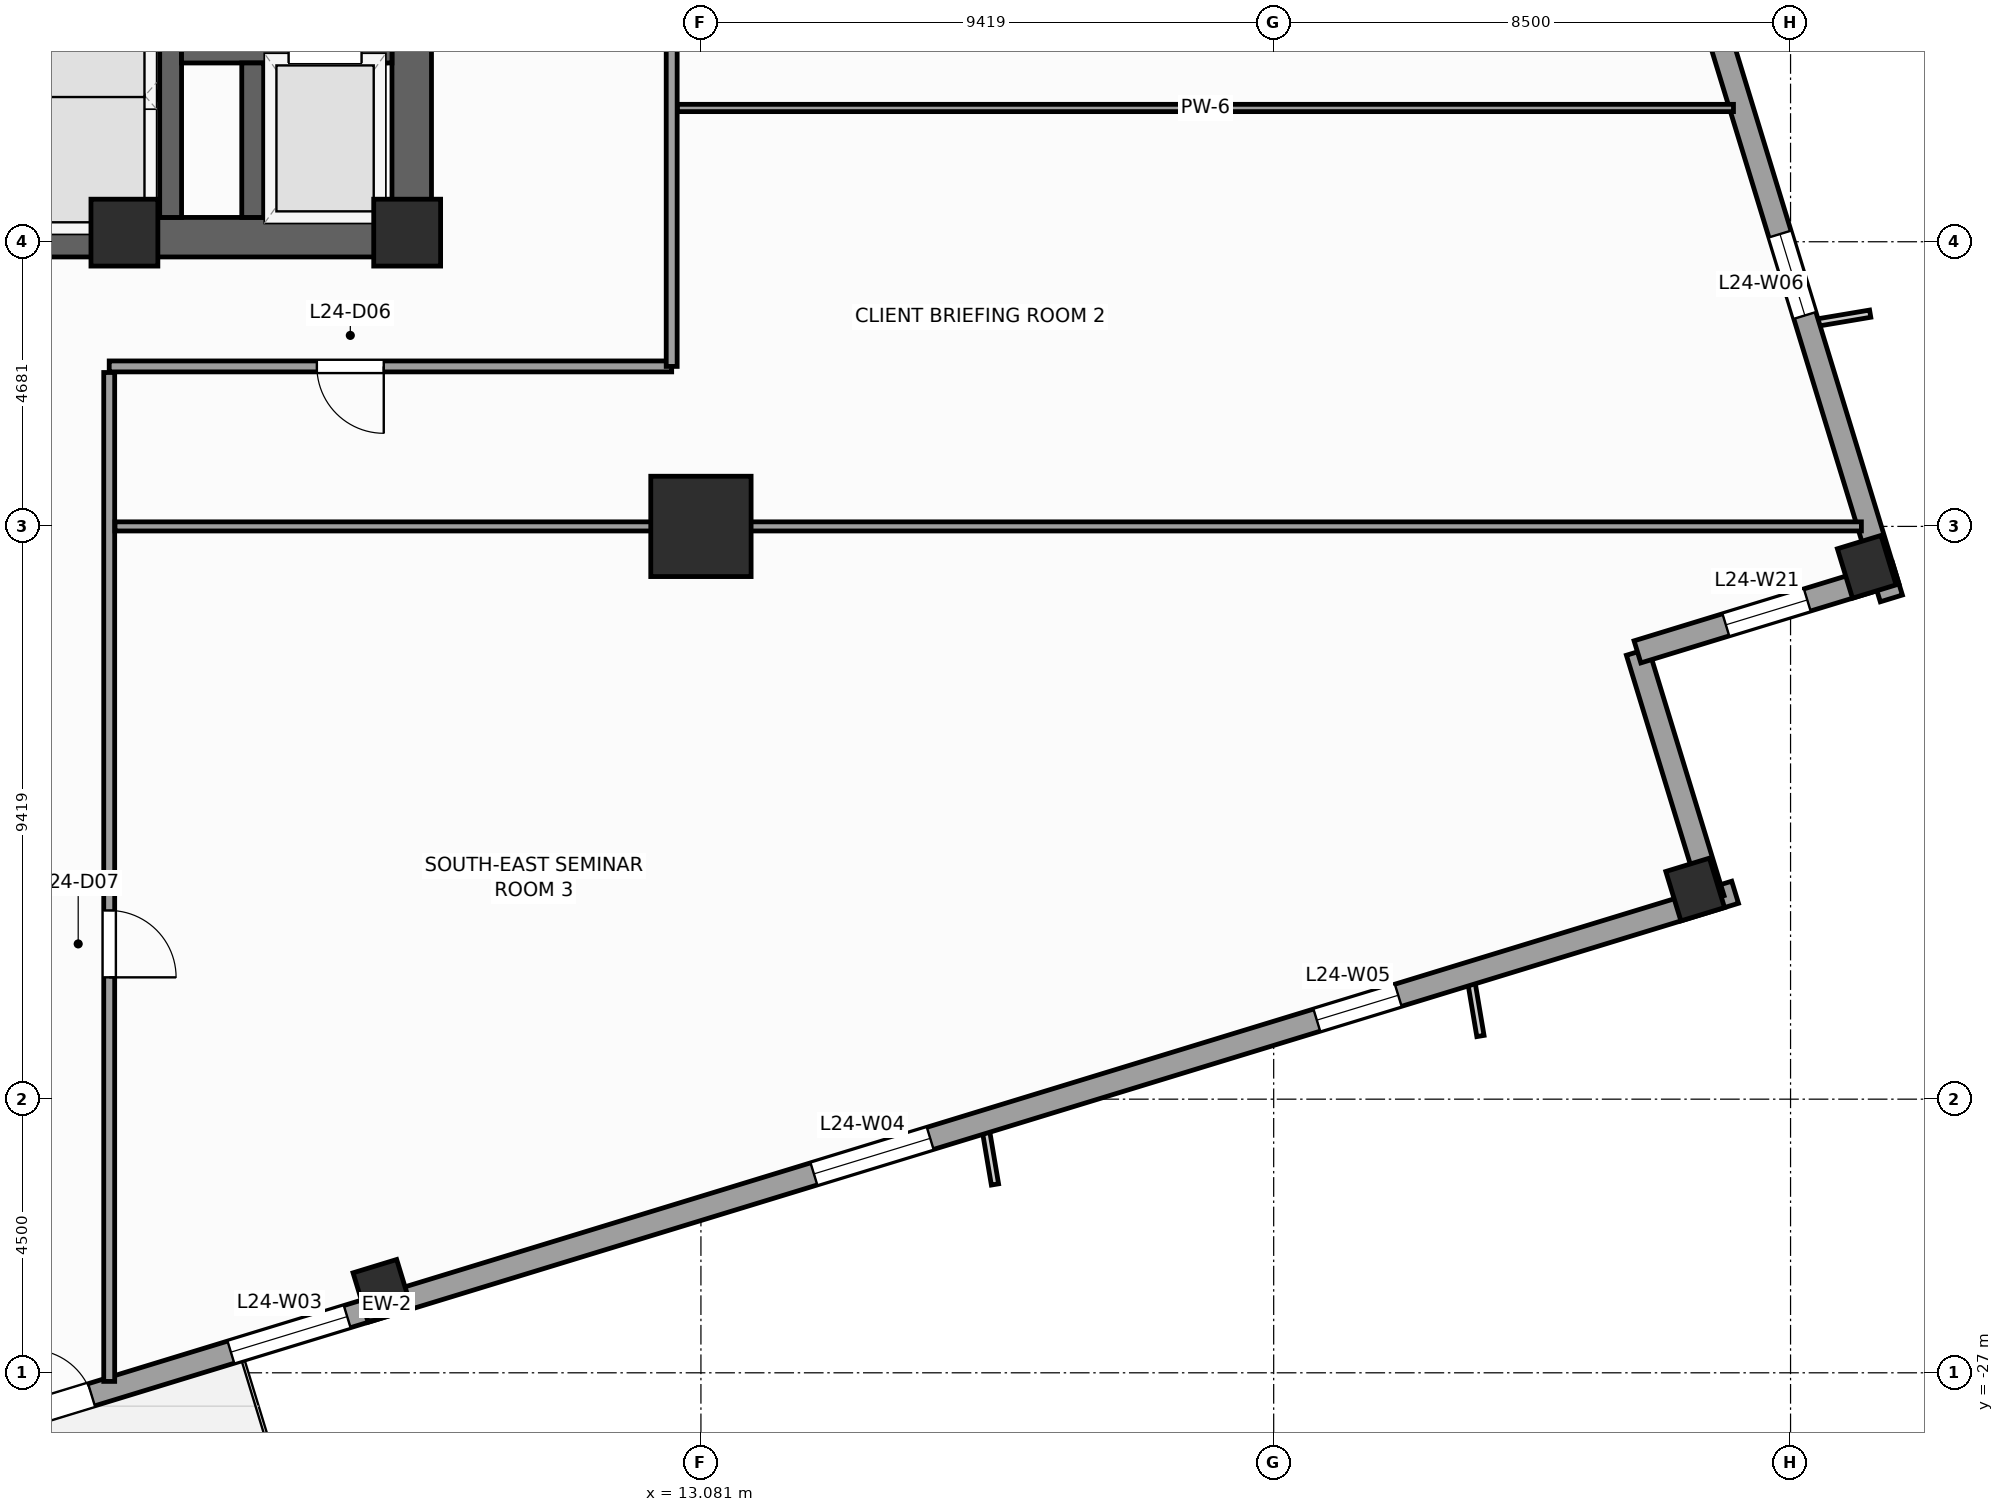
"""IFC4 building model, lengths in metres.
Left out: names, types, materials, properties, quantities, classifications, styles, units other than length and angle.
Written with IfcOpenShell. Run it as: python <this file> out.ifc"""

import sys

from ifc_helpers import new_model, si_unit, direction, frame, frame_2d, origin, origin_2d, place, context, subcontext, project, spatial, rectangle, extrude, source, transform, mapped, element, fill, save


model = new_model("IFC4")
c1 = context("Model", 3, precision=1e-05, world=origin(), true_north=direction((0.0, 1.0)))
c2 = subcontext(c1, "Body", "Model", "MODEL_VIEW")
j1 = project(units=[si_unit("LENGTHUNIT", "METRE"), si_unit("PLANEANGLEUNIT", "RADIAN")], contexts=[c1])
p1 = place(None, origin())
s1 = spatial("IfcSite", under=j1, at=p1, CompositionType="ELEMENT")
p2 = place(p1, origin())
s2 = spatial("IfcBuilding", under=s1, at=p2, CompositionType="ELEMENT")
p3 = place(p2, frame((0.0, 0.0, 103.2)))
s3 = spatial("IfcBuildingStorey", under=s2, at=p3, CompositionType="ELEMENT", Elevation=103.2)
p4 = place(p3, frame((-8.65, -8.325, 0.0), z_axis=(0.0, 0.0, 1.0), x_axis=(1.0, 0.0, 0.0)))
e1 = element("IfcWall", 1, at=p4, inside=s3, PredefinedType="SHEAR", context=c2, shape_type="SweptSolid", body=[
    extrude(rectangle(XDim=17.3, YDim=0.65, at=frame_2d((8.65, 0.0))), origin(), (0.0, 0.0, 1.0), 4.0),
])
p5 = place(p4, frame((8.0, 0.0, 0.0)))
e2 = element("IfcOpeningElement", 2, at=p5, cuts=e1, PredefinedType="OPENING", context=c2, shape_type="SweptSolid", body=[
    extrude(rectangle(XDim=1.3, YDim=2.2, at=frame_2d((0.65, 1.1))), frame((0.0, 0.335, 0.0), z_axis=(0.0, -1.0, 0.0), x_axis=(1.0, 0.0, 0.0)), (0.0, 0.0, 1.0), 0.67),
])
p6 = place(p3, frame((8.325, -8.0, 0.0), z_axis=(0.0, 0.0, 1.0), x_axis=(0.0, 1.0, 0.0)))
e3 = element("IfcWall", 3, at=p6, inside=s3, PredefinedType="SHEAR", context=c2, shape_type="SweptSolid", body=[
    extrude(rectangle(XDim=16.0, YDim=0.65, at=frame_2d((8.0, 0.0))), origin(), (0.0, 0.0, 1.0), 4.0),
])
p7 = place(p6, frame((4.69, 0.0, 0.0)))
e4 = element("IfcOpeningElement", 4, at=p7, cuts=e3, PredefinedType="OPENING", context=c2, shape_type="SweptSolid", body=[
    extrude(rectangle(XDim=1.3, YDim=2.2, at=frame_2d((0.65, 1.1))), frame((0.0, 0.335, 0.0), z_axis=(0.0, -1.0, 0.0), x_axis=(1.0, 0.0, 0.0)), (0.0, 0.0, 1.0), 0.67),
])
p8 = place(p3, frame((4.36, -8.0, 0.0), z_axis=(0.0, 0.0, 1.0), x_axis=(0.0, 1.0, 0.0)))
e5 = element("IfcWall", 5, at=p8, inside=s3, PredefinedType="SHEAR", context=c2, shape_type="SweptSolid", body=[
    extrude(rectangle(XDim=16.0, YDim=0.36, at=frame_2d((8.0, 0.0))), origin(), (0.0, 0.0, 1.0), 4.0),
])
p9 = place(p3, frame((4.54, -5.28, 0.0), z_axis=(0.0, 0.0, 1.0), x_axis=(1.0, 0.0, 0.0)))
e6 = element("IfcWall", 6, at=p9, inside=s3, PredefinedType="SHEAR", context=c2, shape_type="SweptSolid", body=[
    extrude(rectangle(XDim=3.46, YDim=0.36, at=frame_2d((1.73, 0.0))), origin(), (0.0, 0.0, 1.0), 4.0),
])
p10 = place(p9, frame((1.76, 0.0, 0.0)))
e7 = element("IfcOpeningElement", 7, at=p10, cuts=e6, PredefinedType="OPENING", context=c2, shape_type="SweptSolid", body=[
    extrude(rectangle(XDim=1.2, YDim=2.25, at=frame_2d((0.6, 1.125))), frame((0.0, 0.19, 0.0), z_axis=(0.0, -1.0, 0.0), x_axis=(1.0, 0.0, 0.0)), (0.0, 0.0, 1.0), 0.38),
])
p11 = place(p3, frame((5.71, -8.0, 0.0), z_axis=(0.0, 0.0, 1.0), x_axis=(0.0, 1.0, 0.0)))
e8 = element("IfcWall", 8, at=p11, inside=s3, PredefinedType="SHEAR", context=c2, shape_type="SweptSolid", body=[
    extrude(rectangle(XDim=2.54, YDim=0.36, at=frame_2d((1.27, 0.0))), origin(), (0.0, 0.0, 1.0), 4.0),
])
m1 = source(origin(), c2, "Body", "SweptSolid", [
    extrude(rectangle(XDim=1.1, YDim=1.1, at=origin_2d()), origin(), (0.0, 0.0, 1.0), 4.0),
])
for number, where, z_axis, x_axis in (
    (9, (8.25, -8.25, 0.0), (0.0, 0.0, 1.0), (1.0, 0.0, 0.0)),
    (10, (3.6, -8.25, 0.0), (0.0, 0.0, 1.0), (1.0, 0.0, 0.0)),
):
    element("IfcColumn", number, at=place(p3, frame(where, z_axis=z_axis, x_axis=x_axis)), inside=s3, PredefinedType="PILASTER", context=c2, shape_type="MappedRepresentation", body=[
        mapped(m1, transform((0.0, 0.0, 0.0), scale=1.0)),
    ])
m2 = source(origin(), c2, "Body", "SweptSolid", [
    extrude(rectangle(XDim=1.65, YDim=1.65, at=origin_2d()), origin(), (0.0, 0.0, 1.0), 4.0),
])
p12 = place(p3, frame((13.081, -13.081, 0.0), z_axis=(0.0, 0.0, 1.0), x_axis=(1.0, 0.0, 0.0)))
e11 = element("IfcColumn", 11, at=p12, inside=s3, PredefinedType="COLUMN", context=c2, shape_type="MappedRepresentation", body=[
    mapped(m2, transform((0.0, 0.0, 0.0), scale=1.0)),
])
m3 = source(origin(), c2, "Body", "SweptSolid", [
    extrude(rectangle(XDim=0.75, YDim=0.85, at=origin_2d()), origin(), (0.0, 0.0, 1.0), 4.0),
])
for number, where, z_axis, x_axis in (
    (12, (7.843, -25.653, 0.0), (0.0, 0.0, 1.0), (0.956, 0.292, 0.0)),
    (13, (29.431, -19.052, 0.0), (0.0, 0.0, 1.0), (0.956, 0.292, 0.0)),
    (14, (32.253, -13.746, 0.0), (0.0, 0.0, 1.0), (0.956, 0.292, 0.0)),
):
    element("IfcColumn", number, at=place(p3, frame(where, z_axis=z_axis, x_axis=x_axis)), inside=s3, PredefinedType="COLUMN", context=c2, shape_type="MappedRepresentation", body=[
        mapped(m3, transform((0.0, 0.0, 0.0), scale=1.0)),
    ])
p13 = place(p3, frame((-14.265, -32.658, 0.0), z_axis=(0.0, 0.0, 1.0), x_axis=(0.956304320851, 0.292373127906, 0.0)))
e15 = element("IfcWall", 15, at=p13, inside=s3, PredefinedType="STANDARD", context=c2, shape_type="SweptSolid", body=[
    extrude(rectangle(XDim=46.38, YDim=0.38, at=frame_2d((23.19, 0.0))), origin(), (0.0, 0.0, 1.0), 3.14),
])
p14 = place(p13, frame((17.065, 0.0, 0.0)))
e16 = element("IfcOpeningElement", 16, at=p14, cuts=e15, PredefinedType="OPENING", context=c2, shape_type="SweptSolid", body=[
    extrude(rectangle(XDim=1.05, YDim=2.25, at=frame_2d((0.525, 1.125))), frame((0.0, 0.2, 0.0), z_axis=(0.0, -1.0, 0.0), x_axis=(1.0, 0.0, 0.0)), (0.0, 0.0, 1.0), 0.4),
])
p15 = place(p13, frame((4.865, 0.0, 0.51)))
e17 = element("IfcOpeningElement", 17, at=p15, cuts=e15, PredefinedType="OPENING", context=c2, shape_type="SweptSolid", body=[
    extrude(rectangle(XDim=1.4, YDim=2.4, at=frame_2d((0.7, 1.2))), frame((0.0, 0.2, 0.0), z_axis=(0.0, -1.0, 0.0), x_axis=(1.0, 0.0, 0.0)), (0.0, 0.0, 1.0), 0.4),
])
p16 = place(p13, frame((12.45, 0.0, 0.51)))
e18 = element("IfcOpeningElement", 18, at=p16, cuts=e15, PredefinedType="OPENING", context=c2, shape_type="SweptSolid", body=[
    extrude(rectangle(XDim=2.0, YDim=2.4, at=frame_2d((1.0, 1.2))), frame((0.0, 0.2, 0.0), z_axis=(0.0, -1.0, 0.0), x_axis=(1.0, 0.0, 0.0)), (0.0, 0.0, 1.0), 0.4),
])
p17 = place(p13, frame((20.512, 0.0, 0.51)))
e19 = element("IfcOpeningElement", 19, at=p17, cuts=e15, PredefinedType="OPENING", context=c2, shape_type="SweptSolid", body=[
    extrude(rectangle(XDim=2.0, YDim=2.4, at=frame_2d((1.0, 1.2))), frame((0.0, 0.2, 0.0), z_axis=(0.0, -1.0, 0.0), x_axis=(1.0, 0.0, 0.0)), (0.0, 0.0, 1.0), 0.4),
])
p18 = place(p13, frame((30.538, 0.0, 0.51)))
e20 = element("IfcOpeningElement", 20, at=p18, cuts=e15, PredefinedType="OPENING", context=c2, shape_type="SweptSolid", body=[
    extrude(rectangle(XDim=2.0, YDim=2.4, at=frame_2d((1.0, 1.2))), frame((0.0, 0.2, 0.0), z_axis=(0.0, -1.0, 0.0), x_axis=(1.0, 0.0, 0.0)), (0.0, 0.0, 1.0), 0.4),
])
p19 = place(p13, frame((39.187, 0.0, 0.51)))
e21 = element("IfcOpeningElement", 21, at=p19, cuts=e15, PredefinedType="OPENING", context=c2, shape_type="SweptSolid", body=[
    extrude(rectangle(XDim=1.4, YDim=2.4, at=frame_2d((0.7, 1.2))), frame((0.0, 0.2, 0.0), z_axis=(0.0, -1.0, 0.0), x_axis=(1.0, 0.0, 0.0)), (0.0, 0.0, 1.0), 0.4),
])
p20 = place(p3, frame((29.725, -19.208, 0.0), z_axis=(0.0, 0.0, 1.0), x_axis=(-0.292345507338, 0.956312764915, 0.0)))
e22 = element("IfcWall", 22, at=p20, inside=s3, PredefinedType="STANDARD", context=c2, shape_type="SweptSolid", body=[
    extrude(rectangle(XDim=4.25, YDim=0.38, at=frame_2d((2.125, 0.0))), origin(), (0.0, 0.0, 1.0), 3.74),
])
p21 = place(p3, frame((28.482, -15.144, 0.0), z_axis=(0.0, 0.0, 1.0), x_axis=(0.956304176051, 0.292373601522, 0.0)))
e23 = element("IfcWall", 23, at=p21, inside=s3, PredefinedType="STANDARD", context=c2, shape_type="SweptSolid", body=[
    extrude(rectangle(XDim=4.44, YDim=0.38, at=frame_2d((2.22, 0.0))), origin(), (0.0, 0.0, 1.0), 3.04),
])
p22 = place(p21, frame((1.52, 0.0, 0.51)))
e24 = element("IfcOpeningElement", 24, at=p22, cuts=e23, PredefinedType="OPENING", context=c2, shape_type="SweptSolid", body=[
    extrude(rectangle(XDim=1.4, YDim=2.4, at=frame_2d((0.7, 1.2))), frame((0.0, 0.2, 0.0), z_axis=(0.0, -1.0, 0.0), x_axis=(1.0, 0.0, 0.0)), (0.0, 0.0, 1.0), 0.4),
])
p23 = place(p3, frame((32.658, -14.265, 0.0), z_axis=(0.0, 0.0, 1.0), x_axis=(-0.292373127906, 0.956304320851, 0.0)))
e25 = element("IfcWall", 25, at=p23, inside=s3, PredefinedType="STANDARD", context=c2, shape_type="SweptSolid", body=[
    extrude(rectangle(XDim=46.38, YDim=0.38, at=frame_2d((23.19, 0.0))), origin(), (0.0, 0.0, 1.0), 3.14),
])
p24 = place(p23, frame((4.865, 0.0, 0.51)))
e26 = element("IfcOpeningElement", 26, at=p24, cuts=e25, PredefinedType="OPENING", context=c2, shape_type="SweptSolid", body=[
    extrude(rectangle(XDim=1.4, YDim=2.4, at=frame_2d((0.7, 1.2))), frame((0.0, 0.2, 0.0), z_axis=(0.0, -1.0, 0.0), x_axis=(1.0, 0.0, 0.0)), (0.0, 0.0, 1.0), 0.4),
])
p25 = place(p23, frame((10.95, 0.0, 0.51)))
e27 = element("IfcOpeningElement", 27, at=p25, cuts=e25, PredefinedType="OPENING", context=c2, shape_type="SweptSolid", body=[
    extrude(rectangle(XDim=2.0, YDim=2.4, at=frame_2d((1.0, 1.2))), frame((0.0, 0.2, 0.0), z_axis=(0.0, -1.0, 0.0), x_axis=(1.0, 0.0, 0.0)), (0.0, 0.0, 1.0), 0.4),
])
p26 = place(p23, frame((20.512, 0.0, 0.51)))
e28 = element("IfcOpeningElement", 28, at=p26, cuts=e25, PredefinedType="OPENING", context=c2, shape_type="SweptSolid", body=[
    extrude(rectangle(XDim=2.0, YDim=2.4, at=frame_2d((1.0, 1.2))), frame((0.0, 0.2, 0.0), z_axis=(0.0, -1.0, 0.0), x_axis=(1.0, 0.0, 0.0)), (0.0, 0.0, 1.0), 0.4),
])
p27 = place(p23, frame((30.538, 0.0, 0.51)))
e29 = element("IfcOpeningElement", 29, at=p27, cuts=e25, PredefinedType="OPENING", context=c2, shape_type="SweptSolid", body=[
    extrude(rectangle(XDim=2.0, YDim=2.4, at=frame_2d((1.0, 1.2))), frame((0.0, 0.2, 0.0), z_axis=(0.0, -1.0, 0.0), x_axis=(1.0, 0.0, 0.0)), (0.0, 0.0, 1.0), 0.4),
])
p28 = place(p23, frame((39.187, 0.0, 0.51)))
e30 = element("IfcOpeningElement", 30, at=p28, cuts=e25, PredefinedType="OPENING", context=c2, shape_type="SweptSolid", body=[
    extrude(rectangle(XDim=1.4, YDim=2.4, at=frame_2d((0.7, 1.2))), frame((0.0, 0.2, 0.0), z_axis=(0.0, -1.0, 0.0), x_axis=(1.0, 0.0, 0.0)), (0.0, 0.0, 1.0), 0.4),
])
p29 = place(p3, frame((1.9, -6.0, 0.0), z_axis=(0.0, 0.0, 1.0), x_axis=(1.0, 0.0, 0.0)))
e31 = element("IfcWall", 31, at=p29, inside=s3, PredefinedType="PARTITIONING", context=c2, shape_type="SweptSolid", body=[
    extrude(rectangle(XDim=2.26, YDim=0.12, at=frame_2d((1.13, 0.0))), origin(), (0.0, 0.0, 1.0), 3.74),
])
p30 = place(p3, frame((3.35, -10.45, 0.0), z_axis=(0.0, 0.0, 1.0), x_axis=(1.0, 0.0, 0.0)))
e32 = element("IfcWall", 32, at=p30, inside=s3, PredefinedType="PARTITIONING", context=c2, shape_type="SweptSolid", body=[
    extrude(rectangle(XDim=9.25, YDim=0.18, at=frame_2d((4.625, 0.0))), origin(), (0.0, 0.0, 1.0), 3.74),
])
p31 = place(p30, frame((3.415, 0.0, 0.0)))
e33 = element("IfcOpeningElement", 33, at=p31, cuts=e32, PredefinedType="OPENING", context=c2, shape_type="SweptSolid", body=[
    extrude(rectangle(XDim=1.1, YDim=2.2, at=frame_2d((0.55, 1.1))), frame((0.0, 0.1, 0.0), z_axis=(0.0, -1.0, 0.0), x_axis=(1.0, 0.0, 0.0)), (0.0, 0.0, 1.0), 0.2),
])
p32 = place(p3, frame((12.6, -10.45, 0.0), z_axis=(0.0, 0.0, 1.0), x_axis=(0.0, 1.0, 0.0)))
e34 = element("IfcWall", 34, at=p32, inside=s3, PredefinedType="PARTITIONING", context=c2, shape_type="SweptSolid", body=[
    extrude(rectangle(XDim=9.3, YDim=0.18, at=frame_2d((4.65, 0.0))), origin(), (0.0, 0.0, 1.0), 3.74),
])
p33 = place(p3, frame((3.35, -27.142, 0.0), z_axis=(0.0, 0.0, 1.0), x_axis=(0.0, 1.0, 0.0)))
e35 = element("IfcWall", 35, at=p33, inside=s3, PredefinedType="PARTITIONING", context=c2, shape_type="SweptSolid", body=[
    extrude(rectangle(XDim=16.592, YDim=0.18, at=frame_2d((8.296, 0.0))), origin(), (0.0, 0.0, 1.0), 3.74),
])
p34 = place(p33, frame((6.645, 0.0, 0.0)))
e36 = element("IfcOpeningElement", 36, at=p34, cuts=e35, PredefinedType="OPENING", context=c2, shape_type="SweptSolid", body=[
    extrude(rectangle(XDim=1.1, YDim=2.2, at=frame_2d((0.55, 1.1))), frame((0.0, 0.1, 0.0), z_axis=(0.0, -1.0, 0.0), x_axis=(1.0, 0.0, 0.0)), (0.0, 0.0, 1.0), 0.2),
])
p35 = place(p3, frame((3.445, -13.081, 0.0), z_axis=(0.0, 0.0, 1.0), x_axis=(1.0, 0.0, 0.0)))
e37 = element("IfcWall", 37, at=p35, inside=s3, PredefinedType="PARTITIONING", context=c2, shape_type="SweptSolid", body=[
    extrude(rectangle(XDim=28.72, YDim=0.15, at=frame_2d((14.36, 0.0))), origin(), (0.0, 0.0, 1.0), 2.732),
])
p36 = place(p3, frame((12.695, -6.2, 0.0), z_axis=(0.0, 0.0, 1.0), x_axis=(1.0, 0.0, 0.0)))
e38 = element("IfcWall", 38, at=p36, inside=s3, PredefinedType="PARTITIONING", context=c2, shape_type="SweptSolid", body=[
    extrude(rectangle(XDim=17.366, YDim=0.12, at=frame_2d((8.683, 0.0))), origin(), (0.0, 0.0, 1.0), 3.74),
])
m4 = source(origin(), c2, "Body", "SweptSolid", [
    extrude(rectangle(XDim=1.05, YDim=2.25, at=frame_2d((0.525, 1.125))), frame((0.0, 0.025, 0.0), z_axis=(0.0, -1.0, 0.0), x_axis=(1.0, 0.0, 0.0)), (0.0, 0.0, 1.0), 0.05),
])
p37 = place(p14, origin())
e39 = element("IfcDoor", 39, at=p37, inside=s3, OperationType="SINGLE_SWING_LEFT", PredefinedType="DOOR", context=c2, shape_type="MappedRepresentation", body=[
    mapped(m4, transform((0.0, 0.0, 0.0), scale=1.0)),
])
fill(e16, e39)
m5 = source(origin(), c2, "Body", "SweptSolid", [
    extrude(rectangle(XDim=2.0, YDim=2.4, at=frame_2d((1.0, 1.2))), frame((0.0, 0.03, 0.0), z_axis=(0.0, -1.0, 0.0), x_axis=(1.0, 0.0, 0.0)), (0.0, 0.0, 1.0), 0.06),
])
p38 = place(p17, origin())
e40 = element("IfcWindow", 40, at=p38, inside=s3, PartitioningType="SINGLE_PANEL", PredefinedType="WINDOW", context=c2, shape_type="MappedRepresentation", body=[
    mapped(m5, transform((0.0, 0.0, 0.0), scale=1.0)),
])
fill(e19, e40)
p39 = place(p18, origin())
e41 = element("IfcWindow", 41, at=p39, inside=s3, PartitioningType="SINGLE_PANEL", PredefinedType="WINDOW", context=c2, shape_type="MappedRepresentation", body=[
    mapped(m5, transform((0.0, 0.0, 0.0), scale=1.0)),
])
fill(e20, e41)
m6 = source(origin(), c2, "Body", "SweptSolid", [
    extrude(rectangle(XDim=1.4, YDim=2.4, at=frame_2d((0.7, 1.2))), frame((0.0, 0.03, 0.0), z_axis=(0.0, -1.0, 0.0), x_axis=(1.0, 0.0, 0.0)), (0.0, 0.0, 1.0), 0.06),
])
p40 = place(p19, origin())
e42 = element("IfcWindow", 42, at=p40, inside=s3, PartitioningType="SINGLE_PANEL", PredefinedType="WINDOW", context=c2, shape_type="MappedRepresentation", body=[
    mapped(m6, transform((0.0, 0.0, 0.0), scale=1.0)),
])
fill(e21, e42)
p41 = place(p24, origin())
e43 = element("IfcWindow", 43, at=p41, inside=s3, PartitioningType="SINGLE_PANEL", PredefinedType="WINDOW", context=c2, shape_type="MappedRepresentation", body=[
    mapped(m6, transform((0.0, 0.0, 0.0), scale=1.0)),
])
fill(e26, e43)
p42 = place(p22, origin())
e44 = element("IfcWindow", 44, at=p42, inside=s3, PartitioningType="SINGLE_PANEL", PredefinedType="WINDOW", context=c2, shape_type="MappedRepresentation", body=[
    mapped(m6, transform((0.0, 0.0, 0.0), scale=1.0)),
])
fill(e24, e44)
m7 = source(origin(), c2, "Body", "SweptSolid", [
    extrude(rectangle(XDim=1.2, YDim=2.25, at=frame_2d((0.6, 1.125))), frame((0.0, 0.025, 0.0), z_axis=(0.0, -1.0, 0.0), x_axis=(1.0, 0.0, 0.0)), (0.0, 0.0, 1.0), 0.05),
])
p43 = place(p10, origin())
e45 = element("IfcDoor", 45, at=p43, inside=s3, OperationType="DOUBLE_DOOR_SLIDING", PredefinedType="DOOR", context=c2, shape_type="MappedRepresentation", body=[
    mapped(m7, transform((0.0, 0.0, 0.0), scale=1.0)),
])
fill(e7, e45)
m8 = source(origin(), c2, "Body", "SweptSolid", [
    extrude(rectangle(XDim=1.1, YDim=2.2, at=frame_2d((0.55, 1.1))), frame((0.0, 0.025, 0.0), z_axis=(0.0, -1.0, 0.0), x_axis=(1.0, 0.0, 0.0)), (0.0, 0.0, 1.0), 0.05),
])
p44 = place(p31, frame((1.1, 0.0, 0.0), z_axis=(0.0, 0.0, 1.0), x_axis=(-1.0, 0.0, 0.0)))
e46 = element("IfcDoor", 46, at=p44, inside=s3, OperationType="SINGLE_SWING_RIGHT", PredefinedType="DOOR", context=c2, shape_type="MappedRepresentation", body=[
    mapped(m8, transform((0.0, 0.0, 0.0), scale=1.0)),
])
fill(e33, e46)
p45 = place(p34, frame((1.1, 0.0, 0.0), z_axis=(0.0, 0.0, 1.0), x_axis=(-1.0, 0.0, 0.0)))
e47 = element("IfcDoor", 47, at=p45, inside=s3, OperationType="SINGLE_SWING_LEFT", PredefinedType="DOOR", context=c2, shape_type="MappedRepresentation", body=[
    mapped(m8, transform((0.0, 0.0, 0.0), scale=1.0)),
])
fill(e36, e47)
save(model, sys.argv[1])
